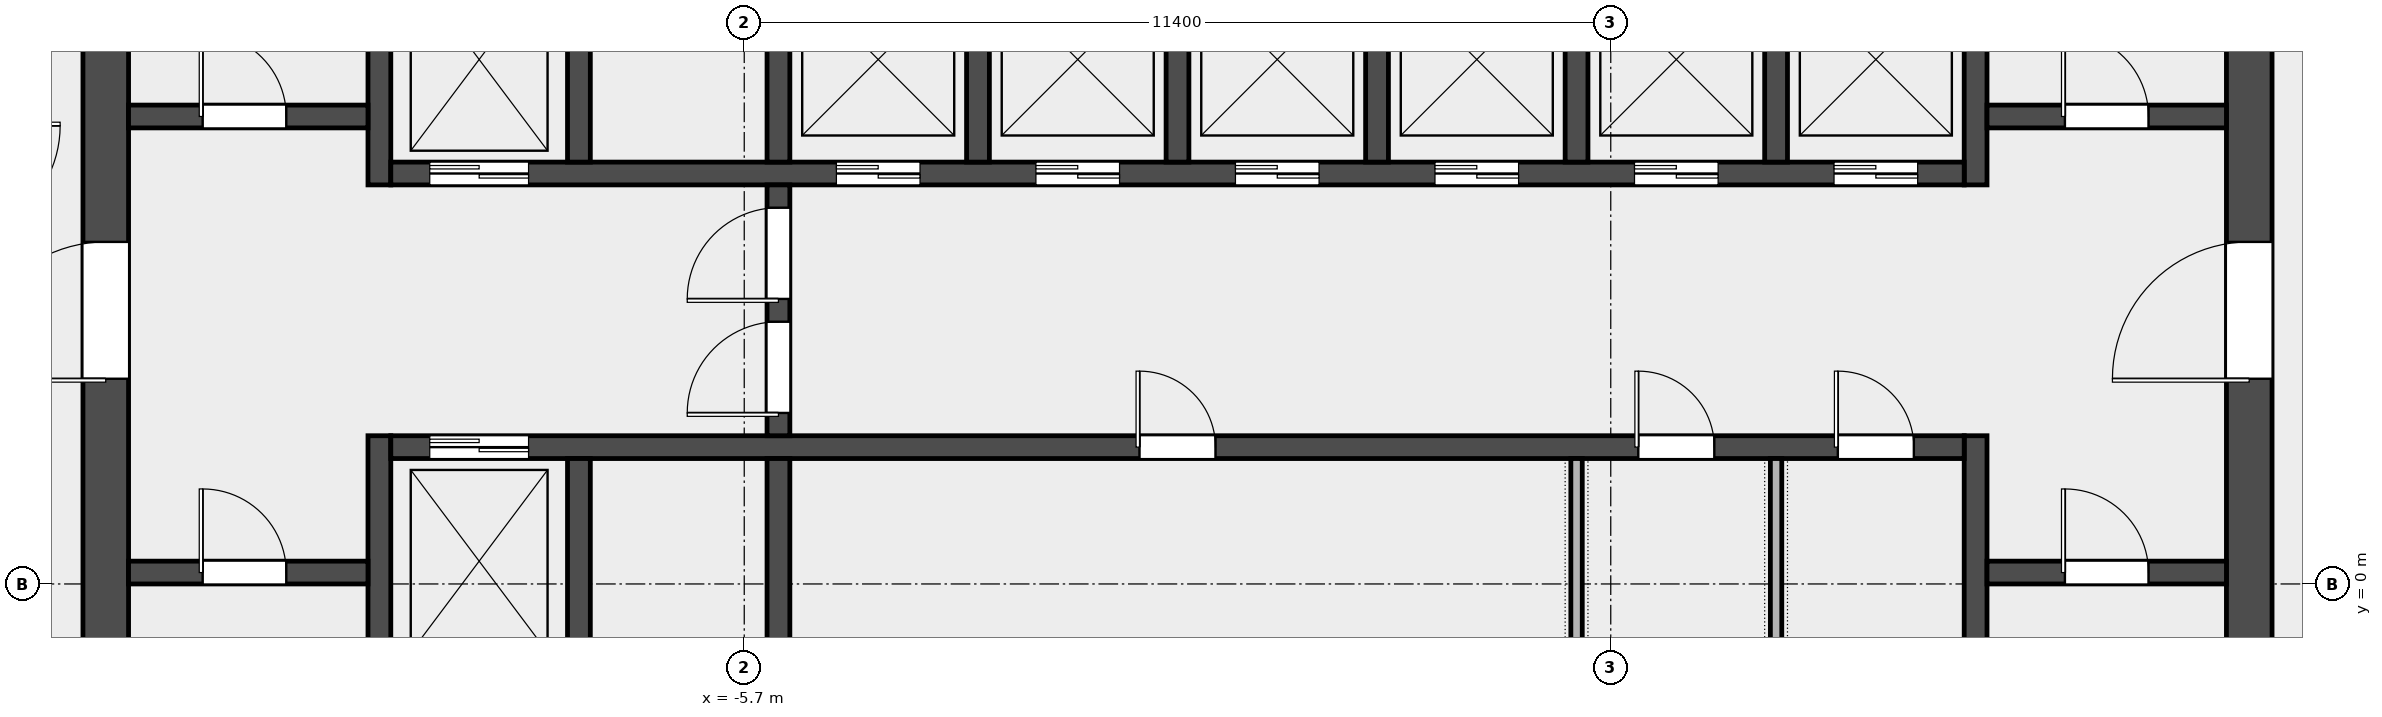
"""IFC4 building model, lengths in metres.
Left out: names, types, materials, properties, quantities, classifications, styles, units other than length and angle.
Written with IfcOpenShell. Run it as: python <this file> out.ifc"""

import sys

from ifc_helpers import new_model, si_unit, direction, frame, frame_2d, origin, place, context, subcontext, project, spatial, rectangle, extrude, element, fill, save


model = new_model("IFC4")
c1 = context("Model", 3, precision=1e-05, world=origin(), true_north=direction((0.0, 1.0)))
c2 = subcontext(c1, "Body", "Model", "MODEL_VIEW")
j1 = project(units=[si_unit("LENGTHUNIT", "METRE"), si_unit("PLANEANGLEUNIT", "RADIAN")], contexts=[c1])
p1 = place(None, origin())
s1 = spatial("IfcSite", under=j1, at=p1, CompositionType="ELEMENT")
p2 = place(p1, origin())
s2 = spatial("IfcBuilding", under=s1, at=p2, CompositionType="ELEMENT")
p3 = place(p2, frame((0.0, 0.0, 223.0)))
s3 = spatial("IfcBuildingStorey", under=s2, at=p3, CompositionType="ELEMENT", Elevation=223.0)
p4 = place(p3, frame((-14.1, -6.6, 0.0), z_axis=(0.0, 0.0, 1.0), x_axis=(0.0, 1.0, 0.0)))
e1 = element("IfcWall", 1, at=p4, inside=s3, PredefinedType="SHEAR", context=c2, shape_type="SweptSolid", body=[
    extrude(rectangle(XDim=19.5, YDim=0.6, at=frame_2d((9.75, 0.0))), origin(), (0.0, 0.0, 1.0), 3.7),
])
p5 = place(p4, frame((9.3, 0.0, 0.0)))
e2 = element("IfcOpeningElement", 2, at=p5, cuts=e1, PredefinedType="OPENING", context=c2, shape_type="SweptSolid", body=[
    extrude(rectangle(XDim=1.8, YDim=2.1, at=frame_2d((0.9, 1.05))), frame((0.0, 0.312, 0.0), z_axis=(0.0, -1.0, 0.0), x_axis=(1.0, 0.0, 0.0)), (0.0, 0.0, 1.0), 0.624),
])
p6 = place(p3, frame((14.1, -6.6, 0.0), z_axis=(0.0, 0.0, 1.0), x_axis=(0.0, 1.0, 0.0)))
e3 = element("IfcWall", 3, at=p6, inside=s3, PredefinedType="SHEAR", context=c2, shape_type="SweptSolid", body=[
    extrude(rectangle(XDim=19.5, YDim=0.6, at=frame_2d((9.75, 0.0))), origin(), (0.0, 0.0, 1.0), 3.7),
])
p7 = place(p6, frame((9.3, 0.0, 0.0)))
e4 = element("IfcOpeningElement", 4, at=p7, cuts=e3, PredefinedType="OPENING", context=c2, shape_type="SweptSolid", body=[
    extrude(rectangle(XDim=1.8, YDim=2.1, at=frame_2d((0.9, 1.05))), frame((0.0, 0.312, 0.0), z_axis=(0.0, -1.0, 0.0), x_axis=(1.0, 0.0, 0.0)), (0.0, 0.0, 1.0), 0.624),
])
p8 = place(p3, frame((-10.5, -6.6, 0.0), z_axis=(0.0, 0.0, 1.0), x_axis=(0.0, 1.0, 0.0)))
e5 = element("IfcWall", 5, at=p8, inside=s3, PredefinedType="SHEAR", context=c2, shape_type="SweptSolid", body=[
    extrude(rectangle(XDim=8.55, YDim=0.3, at=frame_2d((4.275, 0.0))), origin(), (0.0, 0.0, 1.0), 3.7),
])
p9 = place(p3, frame((-10.5, 5.25, 0.0), z_axis=(0.0, 0.0, 1.0), x_axis=(0.0, 1.0, 0.0)))
e6 = element("IfcWall", 6, at=p9, inside=s3, PredefinedType="SHEAR", context=c2, shape_type="SweptSolid", body=[
    extrude(rectangle(XDim=7.65, YDim=0.3, at=frame_2d((3.825, 0.0))), origin(), (0.0, 0.0, 1.0), 3.7),
])
p10 = place(p3, frame((10.5, -6.6, 0.0), z_axis=(0.0, 0.0, 1.0), x_axis=(0.0, 1.0, 0.0)))
e7 = element("IfcWall", 7, at=p10, inside=s3, PredefinedType="SHEAR", context=c2, shape_type="SweptSolid", body=[
    extrude(rectangle(XDim=8.55, YDim=0.3, at=frame_2d((4.275, 0.0))), origin(), (0.0, 0.0, 1.0), 3.7),
])
p11 = place(p3, frame((10.5, 5.25, 0.0), z_axis=(0.0, 0.0, 1.0), x_axis=(0.0, 1.0, 0.0)))
e8 = element("IfcWall", 8, at=p11, inside=s3, PredefinedType="SHEAR", context=c2, shape_type="SweptSolid", body=[
    extrude(rectangle(XDim=7.65, YDim=0.3, at=frame_2d((3.825, 0.0))), origin(), (0.0, 0.0, 1.0), 3.7),
])
p12 = place(p3, frame((-13.8, 0.15, 0.0), z_axis=(0.0, 0.0, 1.0), x_axis=(1.0, 0.0, 0.0)))
e9 = element("IfcWall", 9, at=p12, inside=s3, PredefinedType="SOLIDWALL", context=c2, shape_type="SweptSolid", body=[
    extrude(rectangle(XDim=3.15, YDim=0.3, at=frame_2d((1.575, 0.0))), origin(), (0.0, 0.0, 1.0), 3.7),
])
p13 = place(p12, frame((0.975, 0.0, 0.0)))
e10 = element("IfcOpeningElement", 10, at=p13, cuts=e9, PredefinedType="OPENING", context=c2, shape_type="SweptSolid", body=[
    extrude(rectangle(XDim=1.1, YDim=2.1, at=frame_2d((0.55, 1.05))), frame((0.0, 0.162, 0.0), z_axis=(0.0, -1.0, 0.0), x_axis=(1.0, 0.0, 0.0)), (0.0, 0.0, 1.0), 0.324),
])
p14 = place(p3, frame((-13.8, 6.15, 0.0), z_axis=(0.0, 0.0, 1.0), x_axis=(1.0, 0.0, 0.0)))
e11 = element("IfcWall", 11, at=p14, inside=s3, PredefinedType="SOLIDWALL", context=c2, shape_type="SweptSolid", body=[
    extrude(rectangle(XDim=3.15, YDim=0.3, at=frame_2d((1.575, 0.0))), origin(), (0.0, 0.0, 1.0), 3.7),
])
p15 = place(p14, frame((0.975, 0.0, 0.0)))
e12 = element("IfcOpeningElement", 12, at=p15, cuts=e11, PredefinedType="OPENING", context=c2, shape_type="SweptSolid", body=[
    extrude(rectangle(XDim=1.1, YDim=2.1, at=frame_2d((0.55, 1.05))), frame((0.0, 0.162, 0.0), z_axis=(0.0, -1.0, 0.0), x_axis=(1.0, 0.0, 0.0)), (0.0, 0.0, 1.0), 0.324),
])
p16 = place(p3, frame((10.65, 0.15, 0.0), z_axis=(0.0, 0.0, 1.0), x_axis=(1.0, 0.0, 0.0)))
e13 = element("IfcWall", 13, at=p16, inside=s3, PredefinedType="SOLIDWALL", context=c2, shape_type="SweptSolid", body=[
    extrude(rectangle(XDim=3.15, YDim=0.3, at=frame_2d((1.575, 0.0))), origin(), (0.0, 0.0, 1.0), 3.7),
])
p17 = place(p16, frame((1.025, 0.0, 0.0)))
e14 = element("IfcOpeningElement", 14, at=p17, cuts=e13, PredefinedType="OPENING", context=c2, shape_type="SweptSolid", body=[
    extrude(rectangle(XDim=1.1, YDim=2.1, at=frame_2d((0.55, 1.05))), frame((0.0, 0.162, 0.0), z_axis=(0.0, -1.0, 0.0), x_axis=(1.0, 0.0, 0.0)), (0.0, 0.0, 1.0), 0.324),
])
p18 = place(p3, frame((10.65, 6.15, 0.0), z_axis=(0.0, 0.0, 1.0), x_axis=(1.0, 0.0, 0.0)))
e15 = element("IfcWall", 15, at=p18, inside=s3, PredefinedType="SOLIDWALL", context=c2, shape_type="SweptSolid", body=[
    extrude(rectangle(XDim=3.15, YDim=0.3, at=frame_2d((1.575, 0.0))), origin(), (0.0, 0.0, 1.0), 3.7),
])
p19 = place(p18, frame((1.025, 0.0, 0.0)))
e16 = element("IfcOpeningElement", 16, at=p19, cuts=e15, PredefinedType="OPENING", context=c2, shape_type="SweptSolid", body=[
    extrude(rectangle(XDim=1.1, YDim=2.1, at=frame_2d((0.55, 1.05))), frame((0.0, 0.162, 0.0), z_axis=(0.0, -1.0, 0.0), x_axis=(1.0, 0.0, 0.0)), (0.0, 0.0, 1.0), 0.324),
])
p20 = place(p3, frame((-10.35, 1.8, 0.0), z_axis=(0.0, 0.0, 1.0), x_axis=(1.0, 0.0, 0.0)))
e17 = element("IfcWall", 17, at=p20, inside=s3, PredefinedType="SOLIDWALL", context=c2, shape_type="SweptSolid", body=[
    extrude(rectangle(XDim=20.7, YDim=0.3, at=frame_2d((10.35, 0.0))), origin(), (0.0, 0.0, 1.0), 3.7),
])
p21 = place(p20, frame((0.512, 0.0, 0.0)))
e18 = element("IfcOpeningElement", 18, at=p21, cuts=e17, PredefinedType="OPENING", context=c2, shape_type="SweptSolid", body=[
    extrude(rectangle(XDim=1.3, YDim=2.1, at=frame_2d((0.65, 1.05))), frame((0.0, 0.162, 0.0), z_axis=(0.0, -1.0, 0.0), x_axis=(1.0, 0.0, 0.0)), (0.0, 0.0, 1.0), 0.324),
])
p22 = place(p20, frame((9.85, 0.0, 0.0)))
e19 = element("IfcOpeningElement", 19, at=p22, cuts=e17, PredefinedType="OPENING", context=c2, shape_type="SweptSolid", body=[
    extrude(rectangle(XDim=1.0, YDim=2.1, at=frame_2d((0.5, 1.05))), frame((0.0, 0.162, 0.0), z_axis=(0.0, -1.0, 0.0), x_axis=(1.0, 0.0, 0.0)), (0.0, 0.0, 1.0), 0.324),
])
p23 = place(p20, frame((16.413, 0.0, 0.0)))
e20 = element("IfcOpeningElement", 20, at=p23, cuts=e17, PredefinedType="OPENING", context=c2, shape_type="SweptSolid", body=[
    extrude(rectangle(XDim=1.0, YDim=2.1, at=frame_2d((0.5, 1.05))), frame((0.0, 0.162, 0.0), z_axis=(0.0, -1.0, 0.0), x_axis=(1.0, 0.0, 0.0)), (0.0, 0.0, 1.0), 0.324),
])
p24 = place(p20, frame((19.038, 0.0, 0.0)))
e21 = element("IfcOpeningElement", 21, at=p24, cuts=e17, PredefinedType="OPENING", context=c2, shape_type="SweptSolid", body=[
    extrude(rectangle(XDim=1.0, YDim=2.1, at=frame_2d((0.5, 1.05))), frame((0.0, 0.162, 0.0), z_axis=(0.0, -1.0, 0.0), x_axis=(1.0, 0.0, 0.0)), (0.0, 0.0, 1.0), 0.324),
])
p25 = place(p3, frame((-10.35, 5.4, 0.0), z_axis=(0.0, 0.0, 1.0), x_axis=(1.0, 0.0, 0.0)))
e22 = element("IfcWall", 22, at=p25, inside=s3, PredefinedType="SOLIDWALL", context=c2, shape_type="SweptSolid", body=[
    extrude(rectangle(XDim=20.7, YDim=0.3, at=frame_2d((10.35, 0.0))), origin(), (0.0, 0.0, 1.0), 3.7),
])
p26 = place(p25, frame((0.512, 0.0, 0.0)))
e23 = element("IfcOpeningElement", 23, at=p26, cuts=e22, PredefinedType="OPENING", context=c2, shape_type="SweptSolid", body=[
    extrude(rectangle(XDim=1.3, YDim=2.1, at=frame_2d((0.65, 1.05))), frame((0.0, 0.162, 0.0), z_axis=(0.0, -1.0, 0.0), x_axis=(1.0, 0.0, 0.0)), (0.0, 0.0, 1.0), 0.324),
])
p27 = place(p25, frame((5.863, 0.0, 0.0)))
e24 = element("IfcOpeningElement", 24, at=p27, cuts=e22, PredefinedType="OPENING", context=c2, shape_type="SweptSolid", body=[
    extrude(rectangle(XDim=1.1, YDim=2.1, at=frame_2d((0.55, 1.05))), frame((0.0, 0.162, 0.0), z_axis=(0.0, -1.0, 0.0), x_axis=(1.0, 0.0, 0.0)), (0.0, 0.0, 1.0), 0.324),
])
p28 = place(p25, frame((8.488, 0.0, 0.0)))
e25 = element("IfcOpeningElement", 25, at=p28, cuts=e22, PredefinedType="OPENING", context=c2, shape_type="SweptSolid", body=[
    extrude(rectangle(XDim=1.1, YDim=2.1, at=frame_2d((0.55, 1.05))), frame((0.0, 0.162, 0.0), z_axis=(0.0, -1.0, 0.0), x_axis=(1.0, 0.0, 0.0)), (0.0, 0.0, 1.0), 0.324),
])
p29 = place(p25, frame((11.113, 0.0, 0.0)))
e26 = element("IfcOpeningElement", 26, at=p29, cuts=e22, PredefinedType="OPENING", context=c2, shape_type="SweptSolid", body=[
    extrude(rectangle(XDim=1.1, YDim=2.1, at=frame_2d((0.55, 1.05))), frame((0.0, 0.162, 0.0), z_axis=(0.0, -1.0, 0.0), x_axis=(1.0, 0.0, 0.0)), (0.0, 0.0, 1.0), 0.324),
])
p30 = place(p25, frame((13.738, 0.0, 0.0)))
e27 = element("IfcOpeningElement", 27, at=p30, cuts=e22, PredefinedType="OPENING", context=c2, shape_type="SweptSolid", body=[
    extrude(rectangle(XDim=1.1, YDim=2.1, at=frame_2d((0.55, 1.05))), frame((0.0, 0.162, 0.0), z_axis=(0.0, -1.0, 0.0), x_axis=(1.0, 0.0, 0.0)), (0.0, 0.0, 1.0), 0.324),
])
p31 = place(p25, frame((16.363, 0.0, 0.0)))
e28 = element("IfcOpeningElement", 28, at=p31, cuts=e22, PredefinedType="OPENING", context=c2, shape_type="SweptSolid", body=[
    extrude(rectangle(XDim=1.1, YDim=2.1, at=frame_2d((0.55, 1.05))), frame((0.0, 0.162, 0.0), z_axis=(0.0, -1.0, 0.0), x_axis=(1.0, 0.0, 0.0)), (0.0, 0.0, 1.0), 0.324),
])
p32 = place(p25, frame((18.988, 0.0, 0.0)))
e29 = element("IfcOpeningElement", 29, at=p32, cuts=e22, PredefinedType="OPENING", context=c2, shape_type="SweptSolid", body=[
    extrude(rectangle(XDim=1.1, YDim=2.1, at=frame_2d((0.55, 1.05))), frame((0.0, 0.162, 0.0), z_axis=(0.0, -1.0, 0.0), x_axis=(1.0, 0.0, 0.0)), (0.0, 0.0, 1.0), 0.324),
])
for number, where, z_axis, x_axis in (
    (30, (-7.875, -1.05, 0.0), (0.0, 0.0, 1.0), (0.0, 1.0, 0.0)),
    (31, (-5.25, -1.05, 0.0), (0.0, 0.0, 1.0), (0.0, 1.0, 0.0)),
    (32, (-7.875, 5.55, 0.0), (0.0, 0.0, 1.0), (0.0, 1.0, 0.0)),
    (33, (-5.25, 5.55, 0.0), (0.0, 0.0, 1.0), (0.0, 1.0, 0.0)),
    (34, (-2.625, 5.55, 0.0), (0.0, 0.0, 1.0), (0.0, 1.0, 0.0)),
    (35, (0.0, 5.55, 0.0), (0.0, 0.0, 1.0), (0.0, 1.0, 0.0)),
    (36, (2.625, 5.55, 0.0), (0.0, 0.0, 1.0), (0.0, 1.0, 0.0)),
    (37, (5.25, 5.55, 0.0), (0.0, 0.0, 1.0), (0.0, 1.0, 0.0)),
    (38, (7.875, 5.55, 0.0), (0.0, 0.0, 1.0), (0.0, 1.0, 0.0)),
):
    element("IfcWall", number, at=place(p3, frame(where, z_axis=z_axis, x_axis=x_axis)), inside=s3, PredefinedType="SOLIDWALL", context=c2, shape_type="SweptSolid", body=[
        extrude(rectangle(XDim=2.7, YDim=0.3, at=frame_2d((1.35, 0.0))), origin(), (0.0, 0.0, 1.0), 3.7),
    ])
p33 = place(p3, frame((-5.25, 1.95, 0.0), z_axis=(0.0, 0.0, 1.0), x_axis=(0.0, 1.0, 0.0)))
e39 = element("IfcWall", 39, at=p33, inside=s3, PredefinedType="SOLIDWALL", context=c2, shape_type="SweptSolid", body=[
    extrude(rectangle(XDim=3.3, YDim=0.3, at=frame_2d((1.65, 0.0))), origin(), (0.0, 0.0, 1.0), 3.7),
])
p34 = place(p33, frame((0.3, 0.0, 0.0)))
e40 = element("IfcOpeningElement", 40, at=p34, cuts=e39, PredefinedType="OPENING", context=c2, shape_type="SweptSolid", body=[
    extrude(rectangle(XDim=1.2, YDim=2.1, at=frame_2d((0.6, 1.05))), frame((0.0, 0.162, 0.0), z_axis=(0.0, -1.0, 0.0), x_axis=(1.0, 0.0, 0.0)), (0.0, 0.0, 1.0), 0.324),
])
p35 = place(p33, frame((1.8, 0.0, 0.0)))
e41 = element("IfcOpeningElement", 41, at=p35, cuts=e39, PredefinedType="OPENING", context=c2, shape_type="SweptSolid", body=[
    extrude(rectangle(XDim=1.2, YDim=2.1, at=frame_2d((0.6, 1.05))), frame((0.0, 0.162, 0.0), z_axis=(0.0, -1.0, 0.0), x_axis=(1.0, 0.0, 0.0)), (0.0, 0.0, 1.0), 0.324),
])
for number, where, z_axis, x_axis in (
    (42, (5.25, -1.05, 0.0), (0.0, 0.0, 1.0), (0.0, 1.0, 0.0)),
    (43, (7.875, -1.05, 0.0), (0.0, 0.0, 1.0), (0.0, 1.0, 0.0)),
):
    element("IfcWall", number, at=place(p3, frame(where, z_axis=z_axis, x_axis=x_axis)), inside=s3, PredefinedType="PARTITIONING", context=c2, shape_type="SweptSolid", body=[
        extrude(rectangle(XDim=2.7, YDim=0.15, at=frame_2d((1.35, 0.0))), origin(), (0.0, 0.0, 1.0), 3.7),
    ])
p36 = place(p13, origin())
e44 = element("IfcDoor", 44, at=p36, inside=s3, OperationType="SINGLE_SWING_LEFT", PredefinedType="DOOR", context=c2, shape_type="SweptSolid", body=[
    extrude(rectangle(XDim=1.1, YDim=2.1, at=frame_2d((0.55, 1.05))), frame((0.0, 0.025, 0.0), z_axis=(0.0, -1.0, 0.0), x_axis=(1.0, 0.0, 0.0)), (0.0, 0.0, 1.0), 0.05),
])
fill(e10, e44)
p37 = place(p15, origin())
e45 = element("IfcDoor", 45, at=p37, inside=s3, OperationType="SINGLE_SWING_LEFT", PredefinedType="DOOR", context=c2, shape_type="SweptSolid", body=[
    extrude(rectangle(XDim=1.1, YDim=2.1, at=frame_2d((0.55, 1.05))), frame((0.0, 0.025, 0.0), z_axis=(0.0, -1.0, 0.0), x_axis=(1.0, 0.0, 0.0)), (0.0, 0.0, 1.0), 0.05),
])
fill(e12, e45)
p38 = place(p17, origin())
e46 = element("IfcDoor", 46, at=p38, inside=s3, OperationType="SINGLE_SWING_RIGHT", PredefinedType="DOOR", context=c2, shape_type="SweptSolid", body=[
    extrude(rectangle(XDim=1.1, YDim=2.1, at=frame_2d((0.55, 1.05))), frame((0.0, 0.025, 0.0), z_axis=(0.0, -1.0, 0.0), x_axis=(1.0, 0.0, 0.0)), (0.0, 0.0, 1.0), 0.05),
])
fill(e14, e46)
p39 = place(p19, origin())
e47 = element("IfcDoor", 47, at=p39, inside=s3, OperationType="SINGLE_SWING_RIGHT", PredefinedType="DOOR", context=c2, shape_type="SweptSolid", body=[
    extrude(rectangle(XDim=1.1, YDim=2.1, at=frame_2d((0.55, 1.05))), frame((0.0, 0.025, 0.0), z_axis=(0.0, -1.0, 0.0), x_axis=(1.0, 0.0, 0.0)), (0.0, 0.0, 1.0), 0.05),
])
fill(e16, e47)
p40 = place(p5, origin())
e48 = element("IfcDoor", 48, at=p40, inside=s3, OperationType="DOUBLE_DOOR_SINGLE_SWING", PredefinedType="DOOR", context=c2, shape_type="SweptSolid", body=[
    extrude(rectangle(XDim=1.8, YDim=2.1, at=frame_2d((0.9, 1.05))), frame((0.0, 0.025, 0.0), z_axis=(0.0, -1.0, 0.0), x_axis=(1.0, 0.0, 0.0)), (0.0, 0.0, 1.0), 0.05),
])
fill(e2, e48)
p41 = place(p7, origin())
e49 = element("IfcDoor", 49, at=p41, inside=s3, OperationType="DOUBLE_DOOR_SINGLE_SWING", PredefinedType="DOOR", context=c2, shape_type="SweptSolid", body=[
    extrude(rectangle(XDim=1.8, YDim=2.1, at=frame_2d((0.9, 1.05))), frame((0.0, 0.025, 0.0), z_axis=(0.0, -1.0, 0.0), x_axis=(1.0, 0.0, 0.0)), (0.0, 0.0, 1.0), 0.05),
])
fill(e4, e49)
p42 = place(p34, origin())
e50 = element("IfcDoor", 50, at=p42, inside=s3, OperationType="SINGLE_SWING_LEFT", PredefinedType="DOOR", context=c2, shape_type="SweptSolid", body=[
    extrude(rectangle(XDim=1.2, YDim=2.1, at=frame_2d((0.6, 1.05))), frame((0.0, 0.025, 0.0), z_axis=(0.0, -1.0, 0.0), x_axis=(1.0, 0.0, 0.0)), (0.0, 0.0, 1.0), 0.05),
])
fill(e40, e50)
p43 = place(p35, origin())
e51 = element("IfcDoor", 51, at=p43, inside=s3, OperationType="SINGLE_SWING_RIGHT", PredefinedType="DOOR", context=c2, shape_type="SweptSolid", body=[
    extrude(rectangle(XDim=1.2, YDim=2.1, at=frame_2d((0.6, 1.05))), frame((0.0, 0.025, 0.0), z_axis=(0.0, -1.0, 0.0), x_axis=(1.0, 0.0, 0.0)), (0.0, 0.0, 1.0), 0.05),
])
fill(e41, e51)
p44 = place(p21, origin())
e52 = element("IfcDoor", 52, at=p44, inside=s3, OperationType="DOUBLE_DOOR_SLIDING", PredefinedType="DOOR", context=c2, shape_type="SweptSolid", body=[
    extrude(rectangle(XDim=1.3, YDim=2.1, at=frame_2d((0.65, 1.05))), frame((0.0, 0.025, 0.0), z_axis=(0.0, -1.0, 0.0), x_axis=(1.0, 0.0, 0.0)), (0.0, 0.0, 1.0), 0.05),
])
fill(e18, e52)
p45 = place(p26, origin())
e53 = element("IfcDoor", 53, at=p45, inside=s3, OperationType="DOUBLE_DOOR_SLIDING", PredefinedType="DOOR", context=c2, shape_type="SweptSolid", body=[
    extrude(rectangle(XDim=1.3, YDim=2.1, at=frame_2d((0.65, 1.05))), frame((0.0, 0.025, 0.0), z_axis=(0.0, -1.0, 0.0), x_axis=(1.0, 0.0, 0.0)), (0.0, 0.0, 1.0), 0.05),
])
fill(e23, e53)
p46 = place(p27, origin())
e54 = element("IfcDoor", 54, at=p46, inside=s3, OperationType="DOUBLE_DOOR_SLIDING", PredefinedType="DOOR", context=c2, shape_type="SweptSolid", body=[
    extrude(rectangle(XDim=1.1, YDim=2.1, at=frame_2d((0.55, 1.05))), frame((0.0, 0.025, 0.0), z_axis=(0.0, -1.0, 0.0), x_axis=(1.0, 0.0, 0.0)), (0.0, 0.0, 1.0), 0.05),
])
fill(e24, e54)
p47 = place(p28, origin())
e55 = element("IfcDoor", 55, at=p47, inside=s3, OperationType="DOUBLE_DOOR_SLIDING", PredefinedType="DOOR", context=c2, shape_type="SweptSolid", body=[
    extrude(rectangle(XDim=1.1, YDim=2.1, at=frame_2d((0.55, 1.05))), frame((0.0, 0.025, 0.0), z_axis=(0.0, -1.0, 0.0), x_axis=(1.0, 0.0, 0.0)), (0.0, 0.0, 1.0), 0.05),
])
fill(e25, e55)
p48 = place(p29, origin())
e56 = element("IfcDoor", 56, at=p48, inside=s3, OperationType="DOUBLE_DOOR_SLIDING", PredefinedType="DOOR", context=c2, shape_type="SweptSolid", body=[
    extrude(rectangle(XDim=1.1, YDim=2.1, at=frame_2d((0.55, 1.05))), frame((0.0, 0.025, 0.0), z_axis=(0.0, -1.0, 0.0), x_axis=(1.0, 0.0, 0.0)), (0.0, 0.0, 1.0), 0.05),
])
fill(e26, e56)
p49 = place(p30, origin())
e57 = element("IfcDoor", 57, at=p49, inside=s3, OperationType="DOUBLE_DOOR_SLIDING", PredefinedType="DOOR", context=c2, shape_type="SweptSolid", body=[
    extrude(rectangle(XDim=1.1, YDim=2.1, at=frame_2d((0.55, 1.05))), frame((0.0, 0.025, 0.0), z_axis=(0.0, -1.0, 0.0), x_axis=(1.0, 0.0, 0.0)), (0.0, 0.0, 1.0), 0.05),
])
fill(e27, e57)
p50 = place(p31, origin())
e58 = element("IfcDoor", 58, at=p50, inside=s3, OperationType="DOUBLE_DOOR_SLIDING", PredefinedType="DOOR", context=c2, shape_type="SweptSolid", body=[
    extrude(rectangle(XDim=1.1, YDim=2.1, at=frame_2d((0.55, 1.05))), frame((0.0, 0.025, 0.0), z_axis=(0.0, -1.0, 0.0), x_axis=(1.0, 0.0, 0.0)), (0.0, 0.0, 1.0), 0.05),
])
fill(e28, e58)
p51 = place(p32, origin())
e59 = element("IfcDoor", 59, at=p51, inside=s3, OperationType="DOUBLE_DOOR_SLIDING", PredefinedType="DOOR", context=c2, shape_type="SweptSolid", body=[
    extrude(rectangle(XDim=1.1, YDim=2.1, at=frame_2d((0.55, 1.05))), frame((0.0, 0.025, 0.0), z_axis=(0.0, -1.0, 0.0), x_axis=(1.0, 0.0, 0.0)), (0.0, 0.0, 1.0), 0.05),
])
fill(e29, e59)
p52 = place(p22, origin())
e60 = element("IfcDoor", 60, at=p52, inside=s3, OperationType="SINGLE_SWING_LEFT", PredefinedType="DOOR", context=c2, shape_type="SweptSolid", body=[
    extrude(rectangle(XDim=1.0, YDim=2.1, at=frame_2d((0.5, 1.05))), frame((0.0, 0.025, 0.0), z_axis=(0.0, -1.0, 0.0), x_axis=(1.0, 0.0, 0.0)), (0.0, 0.0, 1.0), 0.05),
])
fill(e19, e60)
p53 = place(p23, origin())
e61 = element("IfcDoor", 61, at=p53, inside=s3, OperationType="SINGLE_SWING_LEFT", PredefinedType="DOOR", context=c2, shape_type="SweptSolid", body=[
    extrude(rectangle(XDim=1.0, YDim=2.1, at=frame_2d((0.5, 1.05))), frame((0.0, 0.025, 0.0), z_axis=(0.0, -1.0, 0.0), x_axis=(1.0, 0.0, 0.0)), (0.0, 0.0, 1.0), 0.05),
])
fill(e20, e61)
p54 = place(p24, origin())
e62 = element("IfcDoor", 62, at=p54, inside=s3, OperationType="SINGLE_SWING_LEFT", PredefinedType="DOOR", context=c2, shape_type="SweptSolid", body=[
    extrude(rectangle(XDim=1.0, YDim=2.1, at=frame_2d((0.5, 1.05))), frame((0.0, 0.025, 0.0), z_axis=(0.0, -1.0, 0.0), x_axis=(1.0, 0.0, 0.0)), (0.0, 0.0, 1.0), 0.05),
])
fill(e21, e62)
save(model, sys.argv[1])
